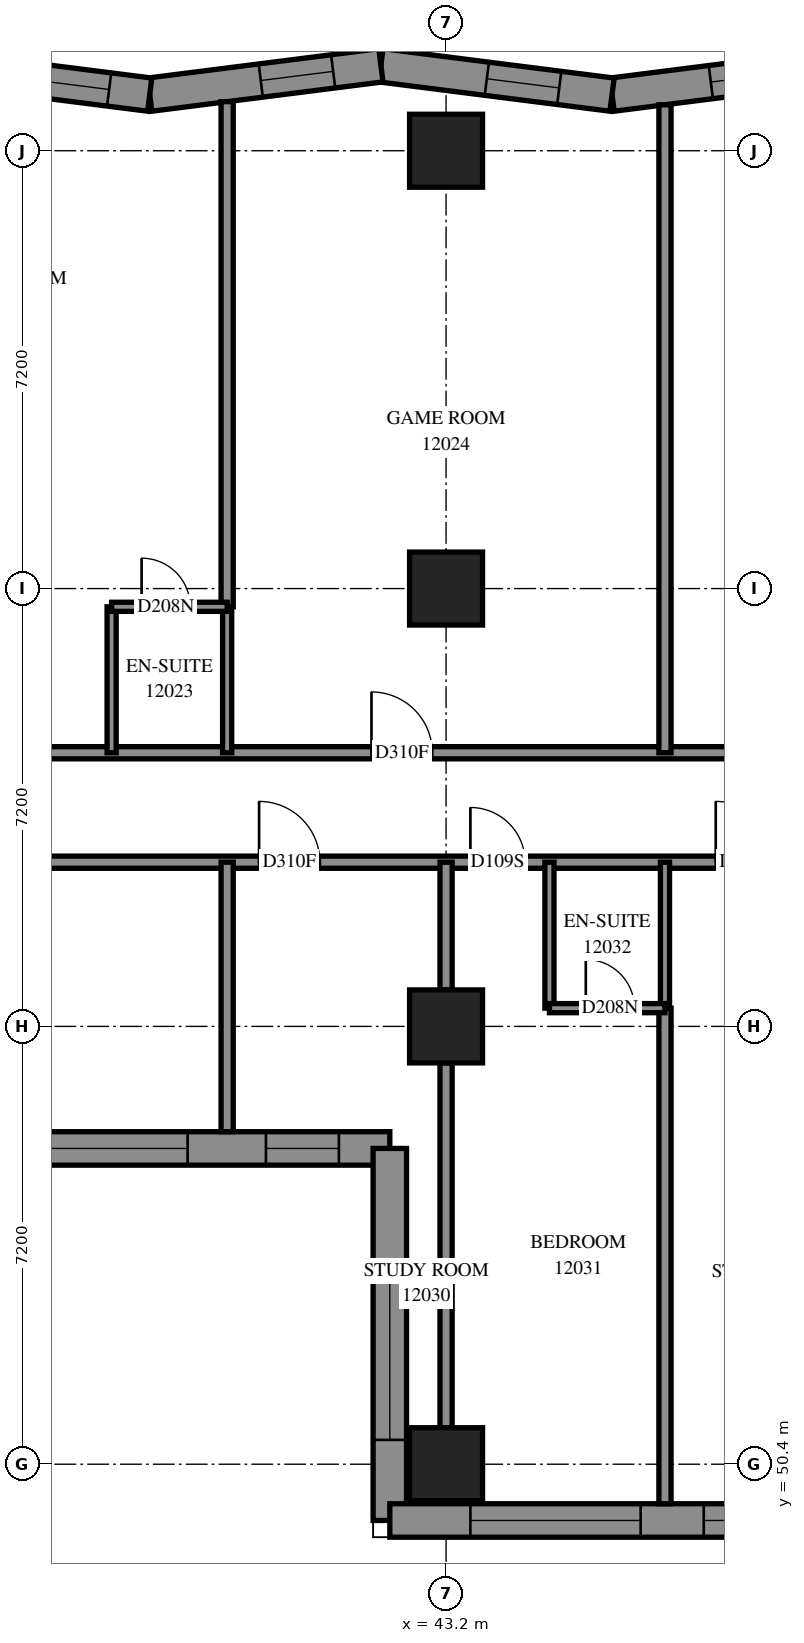
"""IFC4 building model, lengths in metres.
Left out: names, types, materials, properties, quantities, classifications, styles, units other than length and angle.
Written with IfcOpenShell. Run it as: python <this file> out.ifc"""

import sys

from ifc_helpers import new_model, si_unit, direction, frame, frame_2d, origin, origin_2d, place, context, subcontext, project, spatial, polyline, rectangle, outline, extrude, element, fill, save


model = new_model("IFC4")
c1 = context("Model", 3, precision=1e-05, world=origin(), true_north=direction((0.0, 1.0)))
c2 = subcontext(c1, "Body", "Model", "MODEL_VIEW")
j1 = project(units=[si_unit("LENGTHUNIT", "METRE"), si_unit("PLANEANGLEUNIT", "RADIAN")], contexts=[c1])
p1 = place(None, origin())
s1 = spatial("IfcSite", under=j1, at=p1, CompositionType="ELEMENT")
p2 = place(p1, origin())
s2 = spatial("IfcBuilding", under=s1, at=p2, CompositionType="ELEMENT")
p3 = place(p2, frame((0.0, 0.0, 47.4)))
s3 = spatial("IfcBuildingStorey", under=s2, at=p3, CompositionType="ELEMENT", Elevation=47.4)
for number, where, z_axis, x_axis in (
    (1, (43.2, 50.4, 0.0), (0.0, 0.0, 1.0), (1.0, 0.0, 0.0)),
    (2, (43.2, 57.6, 0.0), (0.0, 0.0, 1.0), (1.0, 0.0, 0.0)),
    (3, (43.2, 64.8, 0.0), (0.0, 0.0, 1.0), (1.0, 0.0, 0.0)),
    (4, (43.2, 72.0, 0.0), (0.0, 0.0, 1.0), (1.0, 0.0, 0.0)),
):
    element("IfcColumn", number, at=place(p3, frame(where, z_axis=z_axis, x_axis=x_axis)), inside=s3, PredefinedType="COLUMN", context=c2, shape_type="SweptSolid", body=[
        extrude(rectangle(XDim=1.2, YDim=1.2, at=origin_2d()), origin(), (0.0, 0.0, 1.0), 3.1),
    ])
p4 = place(p3, frame((49.732, 73.405, 0.0), z_axis=(0.0, 0.0, 1.0), x_axis=(-0.9920583495, -0.1257785003, 0.0)))
e5 = element("IfcWall", 5, at=p4, inside=s3, PredefinedType="SOLIDWALL", context=c2, shape_type="SweptSolid", body=[
    extrude(outline(polyline([(-0.035, -0.275), (3.797, -0.275), (3.867, 0.275), (0.035, 0.275), (-0.035, -0.275)])), origin(), (0.0, 0.0, 1.0), 3.1),
])
p5 = place(p4, frame((0.995, 0.0, 0.5)))
e6 = element("IfcOpeningElement", 6, at=p5, cuts=e5, PredefinedType="OPENING", context=c2, shape_type="SweptSolid", body=[
    extrude(rectangle(XDim=1.2, YDim=2.45, at=frame_2d((0.6, 1.225))), frame((0.0, 0.285, 0.0), z_axis=(0.0, -1.0, 0.0), x_axis=(1.0, 0.0, 0.0)), (0.0, 0.0, 1.0), 0.57),
])
p6 = place(p3, frame((45.93, 72.923, 0.0), z_axis=(0.0, 0.0, 1.0), x_axis=(-0.9920583495, 0.1257785003, 0.0)))
e7 = element("IfcWall", 7, at=p6, inside=s3, PredefinedType="SOLIDWALL", context=c2, shape_type="SweptSolid", body=[
    extrude(outline(polyline([(0.035, -0.275), (3.867, -0.275), (3.797, 0.275), (-0.035, 0.275), (0.035, -0.275)])), origin(), (0.0, 0.0, 1.0), 3.1),
])
p7 = place(p6, frame((0.876, 0.0, 0.5)))
e8 = element("IfcOpeningElement", 8, at=p7, cuts=e7, PredefinedType="OPENING", context=c2, shape_type="SweptSolid", body=[
    extrude(rectangle(XDim=1.2, YDim=2.45, at=frame_2d((0.6, 1.225))), frame((0.0, 0.285, 0.0), z_axis=(0.0, -1.0, 0.0), x_axis=(1.0, 0.0, 0.0)), (0.0, 0.0, 1.0), 0.57),
])
p8 = place(p3, frame((42.128, 73.405, 0.0), z_axis=(0.0, 0.0, 1.0), x_axis=(-0.9920583495, -0.1257785003, 0.0)))
e9 = element("IfcWall", 9, at=p8, inside=s3, PredefinedType="SOLIDWALL", context=c2, shape_type="SweptSolid", body=[
    extrude(outline(polyline([(-0.035, -0.275), (3.797, -0.275), (3.867, 0.275), (0.035, 0.275), (-0.035, -0.275)])), origin(), (0.0, 0.0, 1.0), 3.1),
])
p9 = place(p8, frame((0.792, 0.0, 0.5)))
e10 = element("IfcOpeningElement", 10, at=p9, cuts=e9, PredefinedType="OPENING", context=c2, shape_type="SweptSolid", body=[
    extrude(rectangle(XDim=1.2, YDim=2.45, at=frame_2d((0.6, 1.225))), frame((0.0, 0.285, 0.0), z_axis=(0.0, -1.0, 0.0), x_axis=(1.0, 0.0, 0.0)), (0.0, 0.0, 1.0), 0.57),
])
p10 = place(p3, frame((38.327, 72.923, 0.0), z_axis=(0.0, 0.0, 1.0), x_axis=(-0.9920583495, 0.1257785003, 0.0)))
e11 = element("IfcWall", 11, at=p10, inside=s3, PredefinedType="SOLIDWALL", context=c2, shape_type="SweptSolid", body=[
    extrude(outline(polyline([(0.035, -0.275), (3.867, -0.275), (3.797, 0.275), (-0.035, 0.275), (0.035, -0.275)])), origin(), (0.0, 0.0, 1.0), 3.1),
])
p11 = place(p10, frame((0.673, 0.0, 0.5)))
e12 = element("IfcOpeningElement", 12, at=p11, cuts=e11, PredefinedType="OPENING", context=c2, shape_type="SweptSolid", body=[
    extrude(rectangle(XDim=1.2, YDim=2.45, at=frame_2d((0.6, 1.225))), frame((0.0, 0.285, 0.0), z_axis=(0.0, -1.0, 0.0), x_axis=(1.0, 0.0, 0.0)), (0.0, 0.0, 1.0), 0.57),
])
p12 = place(p3, frame((27.875, 55.593, 0.0), z_axis=(0.0, 0.0, 1.0), x_axis=(1.0, 0.0, 0.0)))
e13 = element("IfcWall", 13, at=p12, inside=s3, PredefinedType="SOLIDWALL", context=c2, shape_type="SweptSolid", body=[
    extrude(outline(polyline([(-0.275, -0.275), (14.125, -0.275), (14.675, 0.275), (0.275, 0.275), (-0.275, -0.275)])), origin(), (0.0, 0.0, 1.0), 3.1),
])
p13 = place(p12, frame((1.325, 0.0, 0.5)))
e14 = element("IfcOpeningElement", 14, at=p13, cuts=e13, PredefinedType="OPENING", context=c2, shape_type="SweptSolid", body=[
    extrude(rectangle(XDim=2.8, YDim=2.45, at=frame_2d((1.4, 1.225))), frame((0.0, 0.285, 0.0), z_axis=(0.0, -1.0, 0.0), x_axis=(1.0, 0.0, 0.0)), (0.0, 0.0, 1.0), 0.57),
])
p14 = place(p12, frame((4.925, 0.0, 0.5)))
e15 = element("IfcOpeningElement", 15, at=p14, cuts=e13, PredefinedType="OPENING", context=c2, shape_type="SweptSolid", body=[
    extrude(rectangle(XDim=2.8, YDim=2.45, at=frame_2d((1.4, 1.225))), frame((0.0, 0.285, 0.0), z_axis=(0.0, -1.0, 0.0), x_axis=(1.0, 0.0, 0.0)), (0.0, 0.0, 1.0), 0.57),
])
p15 = place(p12, frame((8.275, 0.0, 0.5)))
e16 = element("IfcOpeningElement", 16, at=p15, cuts=e13, PredefinedType="OPENING", context=c2, shape_type="SweptSolid", body=[
    extrude(rectangle(XDim=2.8, YDim=2.45, at=frame_2d((1.4, 1.225))), frame((0.0, 0.285, 0.0), z_axis=(0.0, -1.0, 0.0), x_axis=(1.0, 0.0, 0.0)), (0.0, 0.0, 1.0), 0.57),
])
p16 = place(p12, frame((12.363, 0.0, 0.5)))
e17 = element("IfcOpeningElement", 17, at=p16, cuts=e13, PredefinedType="OPENING", context=c2, shape_type="SweptSolid", body=[
    extrude(rectangle(XDim=1.2, YDim=2.45, at=frame_2d((0.6, 1.225))), frame((0.0, 0.285, 0.0), z_axis=(0.0, -1.0, 0.0), x_axis=(1.0, 0.0, 0.0)), (0.0, 0.0, 1.0), 0.57),
])
p17 = place(p3, frame((42.275, 55.593, 0.0), z_axis=(0.0, 0.0, 1.0), x_axis=(0.0, -1.0, 0.0)))
e18 = element("IfcWall", 18, at=p17, inside=s3, PredefinedType="SOLIDWALL", context=c2, shape_type="SweptSolid", body=[
    extrude(outline(polyline([(0.275, -0.275), (6.393, -0.275), (5.843, 0.275), (-0.275, 0.275), (0.275, -0.275)])), origin(), (0.0, 0.0, 1.0), 3.1),
])
p18 = place(p17, frame((1.993, 0.0, 0.5)))
e19 = element("IfcOpeningElement", 19, at=p18, cuts=e18, PredefinedType="OPENING", context=c2, shape_type="SweptSolid", body=[
    extrude(rectangle(XDim=2.8, YDim=2.45, at=frame_2d((1.4, 1.225))), frame((0.0, 0.285, 0.0), z_axis=(0.0, -1.0, 0.0), x_axis=(1.0, 0.0, 0.0)), (0.0, 0.0, 1.0), 0.57),
])
p19 = place(p3, frame((42.275, 49.475, 0.0), z_axis=(0.0, 0.0, 1.0), x_axis=(1.0, 0.0, 0.0)))
e20 = element("IfcWall", 20, at=p19, inside=s3, PredefinedType="SOLIDWALL", context=c2, shape_type="SweptSolid", body=[
    extrude(outline(polyline([(-0.275, -0.275), (6.925, -0.275), (7.475, 0.275), (0.275, 0.275), (-0.275, -0.275)])), origin(), (0.0, 0.0, 1.0), 3.1),
])
p20 = place(p19, frame((1.325, 0.0, 0.5)))
e21 = element("IfcOpeningElement", 21, at=p20, cuts=e20, PredefinedType="OPENING", context=c2, shape_type="SweptSolid", body=[
    extrude(rectangle(XDim=2.8, YDim=2.45, at=frame_2d((1.4, 1.225))), frame((0.0, 0.285, 0.0), z_axis=(0.0, -1.0, 0.0), x_axis=(1.0, 0.0, 0.0)), (0.0, 0.0, 1.0), 0.57),
])
p21 = place(p19, frame((5.162, 0.0, 0.5)))
e22 = element("IfcOpeningElement", 22, at=p21, cuts=e20, PredefinedType="OPENING", context=c2, shape_type="SweptSolid", body=[
    extrude(rectangle(XDim=1.2, YDim=2.45, at=frame_2d((0.6, 1.225))), frame((0.0, 0.285, 0.0), z_axis=(0.0, -1.0, 0.0), x_axis=(1.0, 0.0, 0.0)), (0.0, 0.0, 1.0), 0.57),
])
p22 = place(p3, frame((28.802, 60.3, 0.0), z_axis=(0.0, 0.0, 1.0), x_axis=(1.0, 0.0, 0.0)))
e23 = element("IfcWall", 23, at=p22, inside=s3, PredefinedType="PARTITIONING", context=c2, shape_type="SweptSolid", body=[
    extrude(rectangle(XDim=24.108, YDim=0.2, at=frame_2d((12.054, 0.0))), origin(), (0.0, 0.0, 1.0), 3.1),
])
p23 = place(p22, frame((11.323, 0.0, 0.0)))
e24 = element("IfcOpeningElement", 24, at=p23, cuts=e23, PredefinedType="OPENING", context=c2, shape_type="SweptSolid", body=[
    extrude(rectangle(XDim=1.0, YDim=2.1, at=frame_2d((0.5, 1.05))), frame((0.0, 0.11, 0.0), z_axis=(0.0, -1.0, 0.0), x_axis=(1.0, 0.0, 0.0)), (0.0, 0.0, 1.0), 0.22),
])
p24 = place(p22, frame((14.798, 0.0, 0.0)))
e25 = element("IfcOpeningElement", 25, at=p24, cuts=e23, PredefinedType="OPENING", context=c2, shape_type="SweptSolid", body=[
    extrude(rectangle(XDim=0.9, YDim=2.1, at=frame_2d((0.45, 1.05))), frame((0.0, 0.11, 0.0), z_axis=(0.0, -1.0, 0.0), x_axis=(1.0, 0.0, 0.0)), (0.0, 0.0, 1.0), 0.22),
])
p25 = place(p22, frame((18.833, 0.0, 0.0)))
e26 = element("IfcOpeningElement", 26, at=p25, cuts=e23, PredefinedType="OPENING", context=c2, shape_type="SweptSolid", body=[
    extrude(rectangle(XDim=1.0, YDim=2.1, at=frame_2d((0.5, 1.05))), frame((0.0, 0.11, 0.0), z_axis=(0.0, -1.0, 0.0), x_axis=(1.0, 0.0, 0.0)), (0.0, 0.0, 1.0), 0.22),
])
p26 = place(p22, frame((22.839, 0.0, 0.0)))
e27 = element("IfcOpeningElement", 27, at=p26, cuts=e23, PredefinedType="OPENING", context=c2, shape_type="SweptSolid", body=[
    extrude(rectangle(XDim=1.0, YDim=2.1, at=frame_2d((0.5, 1.05))), frame((0.0, 0.11, 0.0), z_axis=(0.0, -1.0, 0.0), x_axis=(1.0, 0.0, 0.0)), (0.0, 0.0, 1.0), 0.22),
])
p27 = place(p3, frame((33.3, 62.1, 0.0), z_axis=(0.0, 0.0, 1.0), x_axis=(1.0, 0.0, 0.0)))
e28 = element("IfcWall", 28, at=p27, inside=s3, PredefinedType="PARTITIONING", context=c2, shape_type="SweptSolid", body=[
    extrude(rectangle(XDim=21.2, YDim=0.2, at=frame_2d((10.6, 0.0))), origin(), (0.0, 0.0, 1.0), 3.1),
])
p28 = place(p27, frame((1.395, 0.0, 0.0)))
e29 = element("IfcOpeningElement", 29, at=p28, cuts=e28, PredefinedType="OPENING", context=c2, shape_type="SweptSolid", body=[
    extrude(rectangle(XDim=0.9, YDim=2.1, at=frame_2d((0.45, 1.05))), frame((0.0, 0.11, 0.0), z_axis=(0.0, -1.0, 0.0), x_axis=(1.0, 0.0, 0.0)), (0.0, 0.0, 1.0), 0.22),
])
p29 = place(p27, frame((8.674, 0.0, 0.0)))
e30 = element("IfcOpeningElement", 30, at=p29, cuts=e28, PredefinedType="OPENING", context=c2, shape_type="SweptSolid", body=[
    extrude(rectangle(XDim=1.0, YDim=2.1, at=frame_2d((0.5, 1.05))), frame((0.0, 0.11, 0.0), z_axis=(0.0, -1.0, 0.0), x_axis=(1.0, 0.0, 0.0)), (0.0, 0.0, 1.0), 0.22),
])
p30 = place(p27, frame((15.874, 0.0, 0.0)))
e31 = element("IfcOpeningElement", 31, at=p30, cuts=e28, PredefinedType="OPENING", context=c2, shape_type="SweptSolid", body=[
    extrude(rectangle(XDim=1.0, YDim=2.1, at=frame_2d((0.5, 1.05))), frame((0.0, 0.11, 0.0), z_axis=(0.0, -1.0, 0.0), x_axis=(1.0, 0.0, 0.0)), (0.0, 0.0, 1.0), 0.22),
])
p31 = place(p3, frame((46.8, 62.1, 0.0), z_axis=(0.0, 0.0, 1.0), x_axis=(0.0, 1.0, 0.0)))
e32 = element("IfcWall", 32, at=p31, inside=s3, PredefinedType="PARTITIONING", context=c2, shape_type="SweptSolid", body=[
    extrude(rectangle(XDim=10.656, YDim=0.2, at=frame_2d((5.328, 0.0))), origin(), (0.0, 0.0, 1.0), 3.1),
])
p32 = place(p3, frame((39.6, 64.5, 0.0), z_axis=(0.0, 0.0, 1.0), x_axis=(0.0, 1.0, 0.0)))
e33 = element("IfcWall", 33, at=p32, inside=s3, PredefinedType="PARTITIONING", context=c2, shape_type="SweptSolid", body=[
    extrude(rectangle(XDim=8.307, YDim=0.2, at=frame_2d((4.154, 0.0))), origin(), (0.0, 0.0, 1.0), 3.1),
])
p33 = place(p3, frame((46.8, 49.75, 0.0), z_axis=(0.0, 0.0, 1.0), x_axis=(0.0, 1.0, 0.0)))
e34 = element("IfcWall", 34, at=p33, inside=s3, PredefinedType="PARTITIONING", context=c2, shape_type="SweptSolid", body=[
    extrude(rectangle(XDim=8.15, YDim=0.2, at=frame_2d((4.075, 0.0))), origin(), (0.0, 0.0, 1.0), 3.1),
])
p34 = place(p3, frame((43.2, 51.0, 0.0), z_axis=(0.0, 0.0, 1.0), x_axis=(0.0, 1.0, 0.0)))
e35 = element("IfcWall", 35, at=p34, inside=s3, PredefinedType="PARTITIONING", context=c2, shape_type="SweptSolid", body=[
    extrude(rectangle(XDim=6.0, YDim=0.2, at=frame_2d((3.0, 0.0))), origin(), (0.0, 0.0, 1.0), 2.6),
])
p35 = place(p3, frame((39.6, 55.868, 0.0), z_axis=(0.0, 0.0, 1.0), x_axis=(0.0, 1.0, 0.0)))
e36 = element("IfcWall", 36, at=p35, inside=s3, PredefinedType="PARTITIONING", context=c2, shape_type="SweptSolid", body=[
    extrude(rectangle(XDim=4.432, YDim=0.2, at=frame_2d((2.216, 0.0))), origin(), (0.0, 0.0, 1.0), 3.1),
])
for number, where, z_axis, x_axis in (
    (37, (37.7, 62.1, 0.0), (0.0, 0.0, 1.0), (0.0, 1.0, 0.0)),
    (38, (39.6, 62.1, 0.0), (0.0, 0.0, 1.0), (0.0, 1.0, 0.0)),
    (39, (44.9, 57.9, 0.0), (0.0, 0.0, 1.0), (0.0, 1.0, 0.0)),
    (40, (46.8, 57.9, 0.0), (0.0, 0.0, 1.0), (0.0, 1.0, 0.0)),
):
    element("IfcWall", number, at=place(p3, frame(where, z_axis=z_axis, x_axis=x_axis)), inside=s3, PredefinedType="PARTITIONING", context=c2, shape_type="SweptSolid", body=[
        extrude(rectangle(XDim=2.4, YDim=0.15, at=frame_2d((1.2, 0.0))), origin(), (0.0, 0.0, 1.0), 3.1),
    ])
p36 = place(p3, frame((43.2, 58.2, 0.0), z_axis=(0.0, 0.0, 1.0), x_axis=(0.0, 1.0, 0.0)))
e41 = element("IfcWall", 41, at=p36, inside=s3, PredefinedType="PARTITIONING", context=c2, shape_type="SweptSolid", body=[
    extrude(rectangle(XDim=2.1, YDim=0.2, at=frame_2d((1.05, 0.0))), origin(), (0.0, 0.0, 1.0), 3.1),
])
p37 = place(p3, frame((37.7, 64.5, 0.0), z_axis=(0.0, 0.0, 1.0), x_axis=(1.0, 0.0, 0.0)))
e42 = element("IfcWall", 42, at=p37, inside=s3, PredefinedType="PARTITIONING", context=c2, shape_type="SweptSolid", body=[
    extrude(rectangle(XDim=1.9, YDim=0.15, at=frame_2d((0.95, 0.0))), origin(), (0.0, 0.0, 1.0), 3.1),
])
p38 = place(p37, frame((0.493, 0.0, 0.0)))
e43 = element("IfcOpeningElement", 43, at=p38, cuts=e42, PredefinedType="OPENING", context=c2, shape_type="SweptSolid", body=[
    extrude(rectangle(XDim=0.8, YDim=2.1, at=frame_2d((0.4, 1.05))), frame((0.0, 0.085, 0.0), z_axis=(0.0, -1.0, 0.0), x_axis=(1.0, 0.0, 0.0)), (0.0, 0.0, 1.0), 0.17),
])
p39 = place(p3, frame((44.9, 57.9, 0.0), z_axis=(0.0, 0.0, 1.0), x_axis=(1.0, 0.0, 0.0)))
e44 = element("IfcWall", 44, at=p39, inside=s3, PredefinedType="PARTITIONING", context=c2, shape_type="SweptSolid", body=[
    extrude(rectangle(XDim=1.9, YDim=0.15, at=frame_2d((0.95, 0.0))), origin(), (0.0, 0.0, 1.0), 3.1),
])
p40 = place(p39, frame((0.598, 0.0, 0.0)))
e45 = element("IfcOpeningElement", 45, at=p40, cuts=e44, PredefinedType="OPENING", context=c2, shape_type="SweptSolid", body=[
    extrude(rectangle(XDim=0.8, YDim=2.1, at=frame_2d((0.4, 1.05))), frame((0.0, 0.085, 0.0), z_axis=(0.0, -1.0, 0.0), x_axis=(1.0, 0.0, 0.0)), (0.0, 0.0, 1.0), 0.17),
])
p41 = place(p5, origin())
e46 = element("IfcWindow", 46, at=p41, inside=s3, PartitioningType="SINGLE_PANEL", PredefinedType="WINDOW", context=c2, shape_type="SweptSolid", body=[
    extrude(rectangle(XDim=1.2, YDim=2.45, at=frame_2d((0.6, 1.225))), frame((0.0, 0.155, 0.0), z_axis=(0.0, -1.0, 0.0), x_axis=(1.0, 0.0, 0.0)), (0.0, 0.0, 1.0), 0.06),
])
fill(e6, e46)
p42 = place(p7, origin())
e47 = element("IfcWindow", 47, at=p42, inside=s3, PartitioningType="SINGLE_PANEL", PredefinedType="WINDOW", context=c2, shape_type="SweptSolid", body=[
    extrude(rectangle(XDim=1.2, YDim=2.45, at=frame_2d((0.6, 1.225))), frame((0.0, 0.155, 0.0), z_axis=(0.0, -1.0, 0.0), x_axis=(1.0, 0.0, 0.0)), (0.0, 0.0, 1.0), 0.06),
])
fill(e8, e47)
p43 = place(p9, origin())
e48 = element("IfcWindow", 48, at=p43, inside=s3, PartitioningType="SINGLE_PANEL", PredefinedType="WINDOW", context=c2, shape_type="SweptSolid", body=[
    extrude(rectangle(XDim=1.2, YDim=2.45, at=frame_2d((0.6, 1.225))), frame((0.0, 0.155, 0.0), z_axis=(0.0, -1.0, 0.0), x_axis=(1.0, 0.0, 0.0)), (0.0, 0.0, 1.0), 0.06),
])
fill(e10, e48)
p44 = place(p11, origin())
e49 = element("IfcWindow", 49, at=p44, inside=s3, PartitioningType="SINGLE_PANEL", PredefinedType="WINDOW", context=c2, shape_type="SweptSolid", body=[
    extrude(rectangle(XDim=1.2, YDim=2.45, at=frame_2d((0.6, 1.225))), frame((0.0, 0.155, 0.0), z_axis=(0.0, -1.0, 0.0), x_axis=(1.0, 0.0, 0.0)), (0.0, 0.0, 1.0), 0.06),
])
fill(e12, e49)
p45 = place(p15, origin())
e50 = element("IfcWindow", 50, at=p45, inside=s3, PartitioningType="SINGLE_PANEL", PredefinedType="WINDOW", context=c2, shape_type="SweptSolid", body=[
    extrude(rectangle(XDim=2.8, YDim=2.45, at=frame_2d((1.4, 1.225))), frame((0.0, 0.155, 0.0), z_axis=(0.0, -1.0, 0.0), x_axis=(1.0, 0.0, 0.0)), (0.0, 0.0, 1.0), 0.06),
])
fill(e16, e50)
p46 = place(p16, origin())
e51 = element("IfcWindow", 51, at=p46, inside=s3, PartitioningType="SINGLE_PANEL", PredefinedType="WINDOW", context=c2, shape_type="SweptSolid", body=[
    extrude(rectangle(XDim=1.2, YDim=2.45, at=frame_2d((0.6, 1.225))), frame((0.0, 0.155, 0.0), z_axis=(0.0, -1.0, 0.0), x_axis=(1.0, 0.0, 0.0)), (0.0, 0.0, 1.0), 0.06),
])
fill(e17, e51)
p47 = place(p18, origin())
e52 = element("IfcWindow", 52, at=p47, inside=s3, PartitioningType="SINGLE_PANEL", PredefinedType="WINDOW", context=c2, shape_type="SweptSolid", body=[
    extrude(rectangle(XDim=2.8, YDim=2.45, at=frame_2d((1.4, 1.225))), frame((0.0, 0.155, 0.0), z_axis=(0.0, -1.0, 0.0), x_axis=(1.0, 0.0, 0.0)), (0.0, 0.0, 1.0), 0.06),
])
fill(e19, e52)
p48 = place(p20, origin())
e53 = element("IfcWindow", 53, at=p48, inside=s3, PartitioningType="SINGLE_PANEL", PredefinedType="WINDOW", context=c2, shape_type="SweptSolid", body=[
    extrude(rectangle(XDim=2.8, YDim=2.45, at=frame_2d((1.4, 1.225))), frame((0.0, 0.155, 0.0), z_axis=(0.0, -1.0, 0.0), x_axis=(1.0, 0.0, 0.0)), (0.0, 0.0, 1.0), 0.06),
])
fill(e21, e53)
p49 = place(p21, origin())
e54 = element("IfcWindow", 54, at=p49, inside=s3, PartitioningType="SINGLE_PANEL", PredefinedType="WINDOW", context=c2, shape_type="SweptSolid", body=[
    extrude(rectangle(XDim=1.2, YDim=2.45, at=frame_2d((0.6, 1.225))), frame((0.0, 0.155, 0.0), z_axis=(0.0, -1.0, 0.0), x_axis=(1.0, 0.0, 0.0)), (0.0, 0.0, 1.0), 0.06),
])
fill(e22, e54)
p50 = place(p38, origin())
e55 = element("IfcDoor", 55, at=p50, inside=s3, OperationType="SINGLE_SWING_RIGHT", PredefinedType="DOOR", context=c2, shape_type="SweptSolid", body=[
    extrude(rectangle(XDim=0.8, YDim=2.1, at=frame_2d((0.4, 1.05))), frame((0.0, 0.025, 0.0), z_axis=(0.0, -1.0, 0.0), x_axis=(1.0, 0.0, 0.0)), (0.0, 0.0, 1.0), 0.05),
])
fill(e43, e55)
p51 = place(p29, origin())
e56 = element("IfcDoor", 56, at=p51, inside=s3, OperationType="SINGLE_SWING_LEFT", PredefinedType="DOOR", context=c2, shape_type="SweptSolid", body=[
    extrude(rectangle(XDim=1.0, YDim=2.1, at=frame_2d((0.5, 1.05))), frame((0.0, 0.025, 0.0), z_axis=(0.0, -1.0, 0.0), x_axis=(1.0, 0.0, 0.0)), (0.0, 0.0, 1.0), 0.05),
])
fill(e30, e56)
p52 = place(p23, origin())
e57 = element("IfcDoor", 57, at=p52, inside=s3, OperationType="SINGLE_SWING_RIGHT", PredefinedType="DOOR", context=c2, shape_type="SweptSolid", body=[
    extrude(rectangle(XDim=1.0, YDim=2.1, at=frame_2d((0.5, 1.05))), frame((0.0, 0.025, 0.0), z_axis=(0.0, -1.0, 0.0), x_axis=(1.0, 0.0, 0.0)), (0.0, 0.0, 1.0), 0.05),
])
fill(e24, e57)
p53 = place(p24, origin())
e58 = element("IfcDoor", 58, at=p53, inside=s3, OperationType="SINGLE_SWING_LEFT", PredefinedType="DOOR", context=c2, shape_type="SweptSolid", body=[
    extrude(rectangle(XDim=0.9, YDim=2.1, at=frame_2d((0.45, 1.05))), frame((0.0, 0.025, 0.0), z_axis=(0.0, -1.0, 0.0), x_axis=(1.0, 0.0, 0.0)), (0.0, 0.0, 1.0), 0.05),
])
fill(e25, e58)
p54 = place(p40, origin())
e59 = element("IfcDoor", 59, at=p54, inside=s3, OperationType="SINGLE_SWING_RIGHT", PredefinedType="DOOR", context=c2, shape_type="SweptSolid", body=[
    extrude(rectangle(XDim=0.8, YDim=2.1, at=frame_2d((0.4, 1.05))), frame((0.0, 0.025, 0.0), z_axis=(0.0, -1.0, 0.0), x_axis=(1.0, 0.0, 0.0)), (0.0, 0.0, 1.0), 0.05),
])
fill(e45, e59)
p55 = place(p25, origin())
e60 = element("IfcDoor", 60, at=p55, inside=s3, OperationType="SINGLE_SWING_RIGHT", PredefinedType="DOOR", context=c2, shape_type="SweptSolid", body=[
    extrude(rectangle(XDim=1.0, YDim=2.1, at=frame_2d((0.5, 1.05))), frame((0.0, 0.025, 0.0), z_axis=(0.0, -1.0, 0.0), x_axis=(1.0, 0.0, 0.0)), (0.0, 0.0, 1.0), 0.05),
])
fill(e26, e60)
save(model, sys.argv[1])
